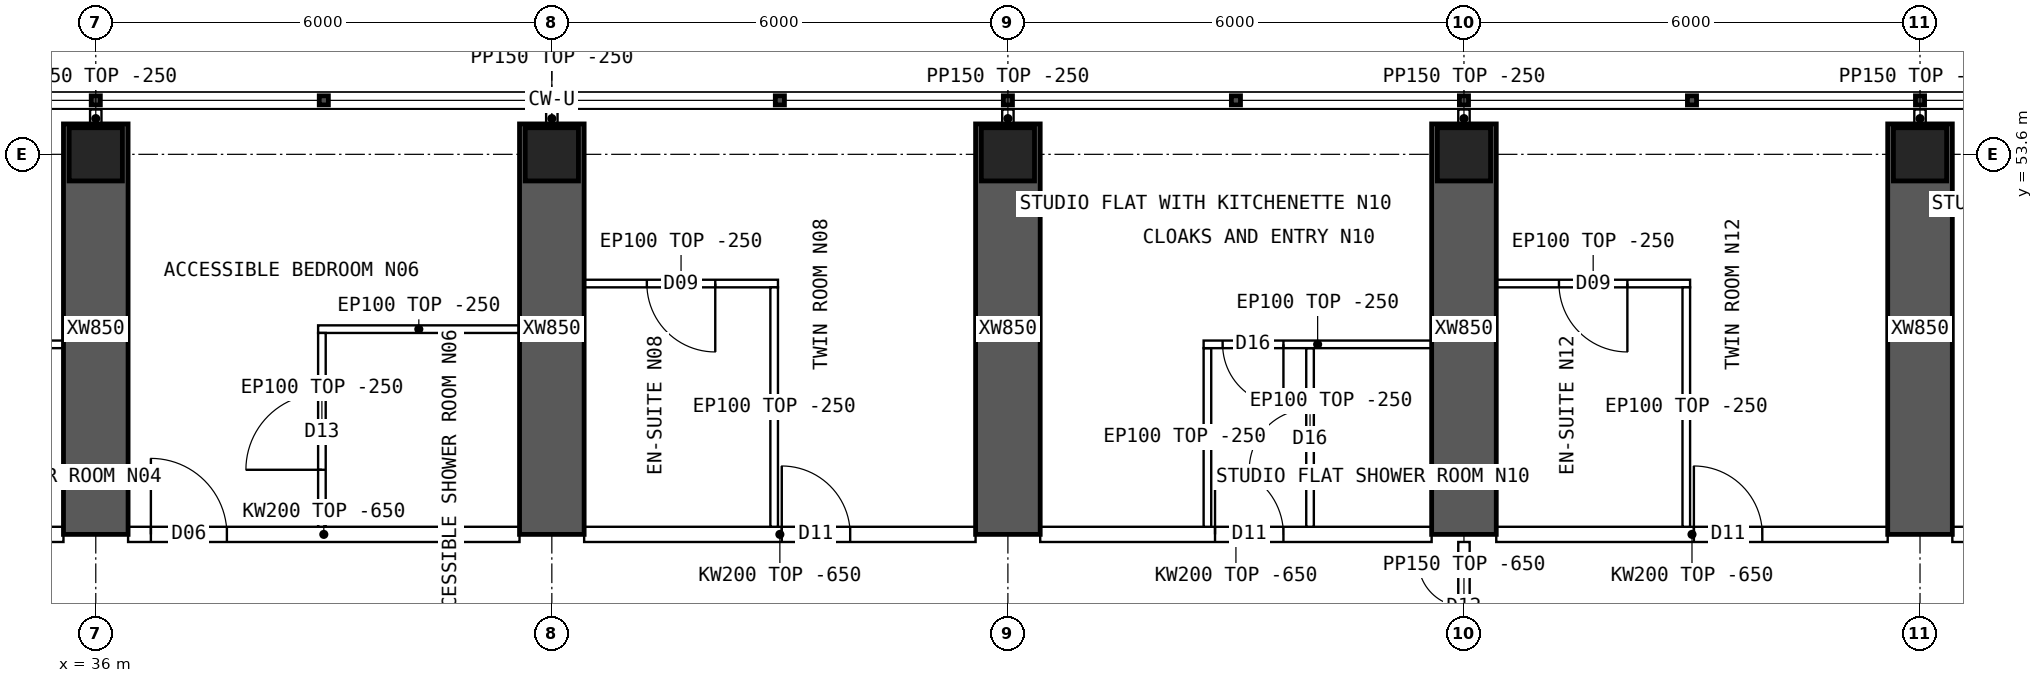
"""IFC4 building model, lengths in metres.
Left out: names, types, materials, properties, quantities, classifications, styles, units other than length and angle.
Written with IfcOpenShell. Run it as: python <this file> out.ifc"""

import sys

from ifc_helpers import new_model, si_unit, direction, frame, frame_2d, origin, origin_2d, place, context, subcontext, project, spatial, polyline, rectangle, hollow_rectangle, outline, extrude, element, fill, save


model = new_model("IFC4")
c1 = context("Model", 3, precision=1e-05, world=origin(), true_north=direction((0.0, 1.0)))
c2 = subcontext(c1, "Body", "Model", "MODEL_VIEW")
j1 = project(units=[si_unit("LENGTHUNIT", "METRE"), si_unit("PLANEANGLEUNIT", "RADIAN")], contexts=[c1])
p1 = place(None, origin())
s1 = spatial("IfcSite", under=j1, at=p1, CompositionType="ELEMENT")
p2 = place(p1, origin())
s2 = spatial("IfcBuilding", under=s1, at=p2, CompositionType="ELEMENT")
p3 = place(p2, frame((0.0, 0.0, 182.35)))
s3 = spatial("IfcBuildingStorey", under=s2, at=p3, CompositionType="ELEMENT", Elevation=182.35)
for number, where, z_axis, x_axis in (
    (1, (36.0, 53.6, 0.0), (0.0, 0.0, 1.0), (1.0, 0.0, 0.0)),
    (2, (42.0, 53.6, 0.0), (0.0, 0.0, 1.0), (1.0, 0.0, 0.0)),
    (3, (48.0, 53.6, 0.0), (0.0, 0.0, 1.0), (1.0, 0.0, 0.0)),
    (4, (54.0, 53.6, 0.0), (0.0, 0.0, 1.0), (1.0, 0.0, 0.0)),
    (5, (60.0, 53.6, 0.0), (0.0, 0.0, 1.0), (1.0, 0.0, 0.0)),
):
    element("IfcColumn", number, at=place(p3, frame(where, z_axis=z_axis, x_axis=x_axis)), inside=s3, PredefinedType="COLUMN", context=c2, shape_type="SweptSolid", body=[
        extrude(hollow_rectangle(XDim=0.7, YDim=0.7, WallThickness=0.07, at=origin_2d()), origin(), (0.0, 0.0, 1.0), 3.75),
    ])
for number, where, z_axis, x_axis in (
    (6, (36.0, 48.6, 0.0), (0.0, 0.0, 1.0), (0.0, 1.0, 0.0)),
    (7, (42.0, 48.6, 0.0), (0.0, 0.0, 1.0), (0.0, 1.0, 0.0)),
    (8, (48.0, 48.6, 0.0), (0.0, 0.0, 1.0), (0.0, 1.0, 0.0)),
    (9, (54.0, 48.6, 0.0), (0.0, 0.0, 1.0), (0.0, 1.0, 0.0)),
    (10, (60.0, 48.6, 0.0), (0.0, 0.0, 1.0), (0.0, 1.0, 0.0)),
):
    element("IfcWall", number, at=place(p3, frame(where, z_axis=z_axis, x_axis=x_axis)), inside=s3, PredefinedType="SHEAR", context=c2, shape_type="SweptSolid", body=[
        extrude(rectangle(XDim=5.4, YDim=0.85, at=frame_2d((2.7, 0.0))), origin(), (0.0, 0.0, 1.0), 3.75),
    ])
p4 = place(p3, frame((30.425, 48.6, 0.0), z_axis=(0.0, 0.0, 1.0), x_axis=(1.0, 0.0, 0.0)))
e11 = element("IfcWall", 11, at=p4, inside=s3, PredefinedType="SOLIDWALL", context=c2, shape_type="SweptSolid", body=[
    extrude(outline(polyline([(0.0, 0.0), (5.15, 0.0), (5.15, 3.1), (0.0, 3.1), (0.0, 0.0)])), frame((0.0, 0.1, 0.0), z_axis=(0.0, -1.0, 0.0), x_axis=(1.0, 0.0, 0.0)), (0.0, 0.0, 1.0), 0.2),
])
p5 = place(p4, frame((2.3, 0.0, 0.0)))
e12 = element("IfcOpeningElement", 12, at=p5, cuts=e11, PredefinedType="OPENING", context=c2, shape_type="SweptSolid", body=[
    extrude(rectangle(XDim=0.9, YDim=2.1, at=frame_2d((0.45, 1.05))), frame((0.0, 0.11, 0.0), z_axis=(0.0, -1.0, 0.0), x_axis=(1.0, 0.0, 0.0)), (0.0, 0.0, 1.0), 0.22),
])
p6 = place(p3, frame((36.425, 48.6, 0.0), z_axis=(0.0, 0.0, 1.0), x_axis=(1.0, 0.0, 0.0)))
e13 = element("IfcWall", 13, at=p6, inside=s3, PredefinedType="SOLIDWALL", context=c2, shape_type="SweptSolid", body=[
    extrude(outline(polyline([(0.0, 0.0), (5.15, 0.0), (5.15, 3.1), (0.0, 3.1), (0.0, 0.0)])), frame((0.0, 0.1, 0.0), z_axis=(0.0, -1.0, 0.0), x_axis=(1.0, 0.0, 0.0)), (0.0, 0.0, 1.0), 0.2),
])
p7 = place(p6, frame((0.3, 0.0, 0.0)))
e14 = element("IfcOpeningElement", 14, at=p7, cuts=e13, PredefinedType="OPENING", context=c2, shape_type="SweptSolid", body=[
    extrude(rectangle(XDim=1.0, YDim=2.1, at=frame_2d((0.5, 1.05))), frame((0.0, 0.11, 0.0), z_axis=(0.0, -1.0, 0.0), x_axis=(1.0, 0.0, 0.0)), (0.0, 0.0, 1.0), 0.22),
])
p8 = place(p3, frame((42.425, 48.6, 0.0), z_axis=(0.0, 0.0, 1.0), x_axis=(1.0, 0.0, 0.0)))
e15 = element("IfcWall", 15, at=p8, inside=s3, PredefinedType="SOLIDWALL", context=c2, shape_type="SweptSolid", body=[
    extrude(outline(polyline([(0.0, 0.0), (5.15, 0.0), (5.15, 3.1), (0.0, 3.1), (0.0, 0.0)])), frame((0.0, 0.1, 0.0), z_axis=(0.0, -1.0, 0.0), x_axis=(1.0, 0.0, 0.0)), (0.0, 0.0, 1.0), 0.2),
])
p9 = place(p8, frame((2.6, 0.0, 0.0)))
e16 = element("IfcOpeningElement", 16, at=p9, cuts=e15, PredefinedType="OPENING", context=c2, shape_type="SweptSolid", body=[
    extrude(rectangle(XDim=0.9, YDim=2.1, at=frame_2d((0.45, 1.05))), frame((0.0, 0.11, 0.0), z_axis=(0.0, -1.0, 0.0), x_axis=(1.0, 0.0, 0.0)), (0.0, 0.0, 1.0), 0.22),
])
p10 = place(p3, frame((48.425, 48.6, 0.0), z_axis=(0.0, 0.0, 1.0), x_axis=(1.0, 0.0, 0.0)))
e17 = element("IfcWall", 17, at=p10, inside=s3, PredefinedType="SOLIDWALL", context=c2, shape_type="SweptSolid", body=[
    extrude(outline(polyline([(0.0, 0.0), (5.15, 0.0), (5.15, 3.1), (0.0, 3.1), (0.0, 0.0)])), frame((0.0, 0.1, 0.0), z_axis=(0.0, -1.0, 0.0), x_axis=(1.0, 0.0, 0.0)), (0.0, 0.0, 1.0), 0.2),
])
p11 = place(p10, frame((2.3, 0.0, 0.0)))
e18 = element("IfcOpeningElement", 18, at=p11, cuts=e17, PredefinedType="OPENING", context=c2, shape_type="SweptSolid", body=[
    extrude(rectangle(XDim=0.9, YDim=2.1, at=frame_2d((0.45, 1.05))), frame((0.0, 0.11, 0.0), z_axis=(0.0, -1.0, 0.0), x_axis=(1.0, 0.0, 0.0)), (0.0, 0.0, 1.0), 0.22),
])
p12 = place(p3, frame((54.425, 48.6, 0.0), z_axis=(0.0, 0.0, 1.0), x_axis=(1.0, 0.0, 0.0)))
e19 = element("IfcWall", 19, at=p12, inside=s3, PredefinedType="SOLIDWALL", context=c2, shape_type="SweptSolid", body=[
    extrude(outline(polyline([(0.0, 0.0), (5.15, 0.0), (5.15, 3.1), (0.0, 3.1), (0.0, 0.0)])), frame((0.0, 0.1, 0.0), z_axis=(0.0, -1.0, 0.0), x_axis=(1.0, 0.0, 0.0)), (0.0, 0.0, 1.0), 0.2),
])
p13 = place(p12, frame((2.6, 0.0, 0.0)))
e20 = element("IfcOpeningElement", 20, at=p13, cuts=e19, PredefinedType="OPENING", context=c2, shape_type="SweptSolid", body=[
    extrude(rectangle(XDim=0.9, YDim=2.1, at=frame_2d((0.45, 1.05))), frame((0.0, 0.11, 0.0), z_axis=(0.0, -1.0, 0.0), x_axis=(1.0, 0.0, 0.0)), (0.0, 0.0, 1.0), 0.22),
])
p14 = place(p3, frame((60.425, 48.6, 0.0), z_axis=(0.0, 0.0, 1.0), x_axis=(1.0, 0.0, 0.0)))
e21 = element("IfcWall", 21, at=p14, inside=s3, PredefinedType="SOLIDWALL", context=c2, shape_type="SweptSolid", body=[
    extrude(outline(polyline([(0.0, 0.0), (5.15, 0.0), (5.15, 3.1), (0.0, 3.1), (0.0, 0.0)])), frame((0.0, 0.1, 0.0), z_axis=(0.0, -1.0, 0.0), x_axis=(1.0, 0.0, 0.0)), (0.0, 0.0, 1.0), 0.2),
])
p15 = place(p14, frame((2.3, 0.0, 0.0)))
e22 = element("IfcOpeningElement", 22, at=p15, cuts=e21, PredefinedType="OPENING", context=c2, shape_type="SweptSolid", body=[
    extrude(rectangle(XDim=0.9, YDim=2.1, at=frame_2d((0.45, 1.05))), frame((0.0, 0.11, 0.0), z_axis=(0.0, -1.0, 0.0), x_axis=(1.0, 0.0, 0.0)), (0.0, 0.0, 1.0), 0.22),
])
p16 = place(p3, frame((32.575, 51.1, 0.0), z_axis=(0.0, 0.0, 1.0), x_axis=(1.0, 0.0, 0.0)))
e23 = element("IfcWall", 23, at=p16, inside=s3, PredefinedType="PARTITIONING", context=c2, shape_type="SweptSolid", body=[
    extrude(rectangle(XDim=3.0, YDim=0.1, at=frame_2d((1.5, 0.0))), origin(), (0.0, 0.0, 1.0), 3.5),
])
p17 = place(p16, frame((0.25, 0.0, 0.0)))
e24 = element("IfcOpeningElement", 24, at=p17, cuts=e23, PredefinedType="OPENING", context=c2, shape_type="SweptSolid", body=[
    extrude(rectangle(XDim=0.8, YDim=2.1, at=frame_2d((0.4, 1.05))), frame((0.0, 0.06, 0.0), z_axis=(0.0, -1.0, 0.0), x_axis=(1.0, 0.0, 0.0)), (0.0, 0.0, 1.0), 0.12),
])
p18 = place(p3, frame((38.925, 51.3, 0.0), z_axis=(0.0, 0.0, 1.0), x_axis=(1.0, 0.0, 0.0)))
e25 = element("IfcWall", 25, at=p18, inside=s3, PredefinedType="PARTITIONING", context=c2, shape_type="SweptSolid", body=[
    extrude(rectangle(XDim=2.65, YDim=0.1, at=frame_2d((1.325, 0.0))), origin(), (0.0, 0.0, 1.0), 3.5),
])
p19 = place(p3, frame((38.975, 51.25, 0.0), z_axis=(0.0, 0.0, 1.0), x_axis=(0.0, -1.0, 0.0)))
e26 = element("IfcWall", 26, at=p19, inside=s3, PredefinedType="PARTITIONING", context=c2, shape_type="SweptSolid", body=[
    extrude(outline(polyline([(0.0, 0.0), (2.55, 0.0), (2.55, 3.1), (2.502, 3.1), (2.5, 3.5), (0.0, 3.5), (0.0, 0.0)])), frame((0.0, 0.05, 0.0), z_axis=(0.0, -1.0, 0.0), x_axis=(1.0, 0.0, 0.0)), (0.0, 0.0, 1.0), 0.1),
])
p20 = place(p19, frame((0.8, 0.0, 0.0)))
e27 = element("IfcOpeningElement", 27, at=p20, cuts=e26, PredefinedType="OPENING", context=c2, shape_type="SweptSolid", body=[
    extrude(rectangle(XDim=1.0, YDim=2.1, at=frame_2d((0.5, 1.05))), frame((0.0, 0.06, 0.0), z_axis=(0.0, -1.0, 0.0), x_axis=(1.0, 0.0, 0.0)), (0.0, 0.0, 1.0), 0.12),
])
p21 = place(p3, frame((42.425, 51.9, 0.0), z_axis=(0.0, 0.0, 1.0), x_axis=(1.0, 0.0, 0.0)))
e28 = element("IfcWall", 28, at=p21, inside=s3, PredefinedType="PARTITIONING", context=c2, shape_type="SweptSolid", body=[
    extrude(rectangle(XDim=2.55, YDim=0.1, at=frame_2d((1.275, 0.0))), origin(), (0.0, 0.0, 1.0), 3.5),
])
p22 = place(p21, frame((0.825, 0.0, 0.0)))
e29 = element("IfcOpeningElement", 29, at=p22, cuts=e28, PredefinedType="OPENING", context=c2, shape_type="SweptSolid", body=[
    extrude(rectangle(XDim=0.9, YDim=2.1, at=frame_2d((0.45, 1.05))), frame((0.0, 0.06, 0.0), z_axis=(0.0, -1.0, 0.0), x_axis=(1.0, 0.0, 0.0)), (0.0, 0.0, 1.0), 0.12),
])
p23 = place(p3, frame((44.925, 51.85, 0.0), z_axis=(0.0, 0.0, 1.0), x_axis=(0.0, -1.0, 0.0)))
e30 = element("IfcWall", 30, at=p23, inside=s3, PredefinedType="PARTITIONING", context=c2, shape_type="SweptSolid", body=[
    extrude(outline(polyline([(0.0, 0.0), (3.15, 0.0), (3.15, 3.1), (3.102, 3.1), (3.1, 3.5), (0.0, 3.5), (0.0, 0.0)])), frame((0.0, 0.05, 0.0), z_axis=(0.0, -1.0, 0.0), x_axis=(1.0, 0.0, 0.0)), (0.0, 0.0, 1.0), 0.1),
])
p24 = place(p3, frame((50.575, 51.1, 0.0), z_axis=(0.0, 0.0, 1.0), x_axis=(1.0, 0.0, 0.0)))
e31 = element("IfcWall", 31, at=p24, inside=s3, PredefinedType="PARTITIONING", context=c2, shape_type="SweptSolid", body=[
    extrude(rectangle(XDim=3.0, YDim=0.1, at=frame_2d((1.5, 0.0))), origin(), (0.0, 0.0, 1.0), 3.5),
])
p25 = place(p24, frame((0.25, 0.0, 0.0)))
e32 = element("IfcOpeningElement", 32, at=p25, cuts=e31, PredefinedType="OPENING", context=c2, shape_type="SweptSolid", body=[
    extrude(rectangle(XDim=0.8, YDim=2.1, at=frame_2d((0.4, 1.05))), frame((0.0, 0.06, 0.0), z_axis=(0.0, -1.0, 0.0), x_axis=(1.0, 0.0, 0.0)), (0.0, 0.0, 1.0), 0.12),
])
p26 = place(p3, frame((50.625, 51.05, 0.0), z_axis=(0.0, 0.0, 1.0), x_axis=(0.0, -1.0, 0.0)))
e33 = element("IfcWall", 33, at=p26, inside=s3, PredefinedType="PARTITIONING", context=c2, shape_type="SweptSolid", body=[
    extrude(outline(polyline([(0.0, 0.0), (2.35, 0.0), (2.35, 3.1), (2.302, 3.1), (2.3, 3.5), (0.0, 3.5), (0.0, 0.0)])), frame((0.0, 0.05, 0.0), z_axis=(0.0, -1.0, 0.0), x_axis=(1.0, 0.0, 0.0)), (0.0, 0.0, 1.0), 0.1),
])
p27 = place(p3, frame((51.975, 51.05, 0.0), z_axis=(0.0, 0.0, 1.0), x_axis=(0.0, -1.0, 0.0)))
e34 = element("IfcWall", 34, at=p27, inside=s3, PredefinedType="PARTITIONING", context=c2, shape_type="SweptSolid", body=[
    extrude(outline(polyline([(0.0, 0.0), (2.35, 0.0), (2.35, 3.1), (2.302, 3.1), (2.3, 3.5), (0.0, 3.5), (0.0, 0.0)])), frame((0.0, 0.05, 0.0), z_axis=(0.0, -1.0, 0.0), x_axis=(1.0, 0.0, 0.0)), (0.0, 0.0, 1.0), 0.1),
])
p28 = place(p27, frame((0.8, 0.0, 0.0)))
e35 = element("IfcOpeningElement", 35, at=p28, cuts=e34, PredefinedType="OPENING", context=c2, shape_type="SweptSolid", body=[
    extrude(rectangle(XDim=0.8, YDim=2.1, at=frame_2d((0.4, 1.05))), frame((0.0, 0.06, 0.0), z_axis=(0.0, -1.0, 0.0), x_axis=(1.0, 0.0, 0.0)), (0.0, 0.0, 1.0), 0.12),
])
p29 = place(p3, frame((54.425, 51.9, 0.0), z_axis=(0.0, 0.0, 1.0), x_axis=(1.0, 0.0, 0.0)))
e36 = element("IfcWall", 36, at=p29, inside=s3, PredefinedType="PARTITIONING", context=c2, shape_type="SweptSolid", body=[
    extrude(rectangle(XDim=2.55, YDim=0.1, at=frame_2d((1.275, 0.0))), origin(), (0.0, 0.0, 1.0), 3.5),
])
p30 = place(p29, frame((0.825, 0.0, 0.0)))
e37 = element("IfcOpeningElement", 37, at=p30, cuts=e36, PredefinedType="OPENING", context=c2, shape_type="SweptSolid", body=[
    extrude(rectangle(XDim=0.9, YDim=2.1, at=frame_2d((0.45, 1.05))), frame((0.0, 0.06, 0.0), z_axis=(0.0, -1.0, 0.0), x_axis=(1.0, 0.0, 0.0)), (0.0, 0.0, 1.0), 0.12),
])
p31 = place(p3, frame((56.925, 51.85, 0.0), z_axis=(0.0, 0.0, 1.0), x_axis=(0.0, -1.0, 0.0)))
e38 = element("IfcWall", 38, at=p31, inside=s3, PredefinedType="PARTITIONING", context=c2, shape_type="SweptSolid", body=[
    extrude(outline(polyline([(0.0, 0.0), (3.15, 0.0), (3.15, 3.1), (3.102, 3.1), (3.1, 3.5), (0.0, 3.5), (0.0, 0.0)])), frame((0.0, 0.05, 0.0), z_axis=(0.0, -1.0, 0.0), x_axis=(1.0, 0.0, 0.0)), (0.0, 0.0, 1.0), 0.1),
])
p32 = place(p3, frame((54.0, 46.8, 0.0), z_axis=(0.0, 0.0, 1.0), x_axis=(0.0, 1.0, 0.0)))
e39 = element("IfcWall", 39, at=p32, inside=s3, PredefinedType="PARTITIONING", context=c2, shape_type="SweptSolid", body=[
    extrude(outline(polyline([(0.0, 0.0), (1.7, 0.0), (1.7, 3.1), (0.0, 3.1), (0.0, 0.0)])), frame((0.0, 0.075, 0.0), z_axis=(0.0, -1.0, 0.0), x_axis=(1.0, 0.0, 0.0)), (0.0, 0.0, 1.0), 0.15),
])
p33 = place(p32, frame((0.25, 0.0, 0.0)))
e40 = element("IfcOpeningElement", 40, at=p33, cuts=e39, PredefinedType="OPENING", context=c2, shape_type="SweptSolid", body=[
    extrude(rectangle(XDim=1.2, YDim=2.1, at=frame_2d((0.6, 1.05))), frame((0.0, 0.085, 0.0), z_axis=(0.0, -1.0, 0.0), x_axis=(1.0, 0.0, 0.0)), (0.0, 0.0, 1.0), 0.17),
])
for number, where, z_axis, x_axis in (
    (41, (36.0, 53.95, 0.0), (0.0, 0.0, 1.0), (0.0, 1.0, 0.0)),
    (42, (42.0, 53.95, 0.0), (0.0, 0.0, 1.0), (0.0, 1.0, 0.0)),
    (43, (48.0, 53.95, 0.0), (0.0, 0.0, 1.0), (0.0, 1.0, 0.0)),
    (44, (54.0, 53.95, 0.0), (0.0, 0.0, 1.0), (0.0, 1.0, 0.0)),
    (45, (60.0, 53.95, 0.0), (0.0, 0.0, 1.0), (0.0, 1.0, 0.0)),
):
    element("IfcWall", number, at=place(p3, frame(where, z_axis=z_axis, x_axis=x_axis)), inside=s3, PredefinedType="PARTITIONING", context=c2, shape_type="SweptSolid", body=[
        extrude(rectangle(XDim=0.24, YDim=0.15, at=frame_2d((0.12, 0.0))), origin(), (0.0, 0.0, 1.0), 3.5),
    ])
p34 = place(p20, origin())
e46 = element("IfcDoor", 46, at=p34, inside=s3, OperationType="SINGLE_SWING_RIGHT", PredefinedType="DOOR", context=c2, shape_type="SweptSolid", body=[
    extrude(rectangle(XDim=1.0, YDim=2.1, at=frame_2d((0.5, 1.05))), frame((0.0, 0.025, 0.0), z_axis=(0.0, -1.0, 0.0), x_axis=(1.0, 0.0, 0.0)), (0.0, 0.0, 1.0), 0.05),
])
fill(e27, e46)
p35 = place(p7, origin())
e47 = element("IfcDoor", 47, at=p35, inside=s3, OperationType="SINGLE_SWING_LEFT", PredefinedType="DOOR", context=c2, shape_type="SweptSolid", body=[
    extrude(rectangle(XDim=1.0, YDim=2.1, at=frame_2d((0.5, 1.05))), frame((0.0, 0.025, 0.0), z_axis=(0.0, -1.0, 0.0), x_axis=(1.0, 0.0, 0.0)), (0.0, 0.0, 1.0), 0.05),
])
fill(e14, e47)
p36 = place(p22, origin())
e48 = element("IfcDoor", 48, at=p36, inside=s3, OperationType="SINGLE_SWING_RIGHT", PredefinedType="DOOR", context=c2, shape_type="SweptSolid", body=[
    extrude(rectangle(XDim=0.9, YDim=2.1, at=frame_2d((0.45, 1.05))), frame((0.0, 0.025, 0.0), z_axis=(0.0, -1.0, 0.0), x_axis=(1.0, 0.0, 0.0)), (0.0, 0.0, 1.0), 0.05),
])
fill(e29, e48)
p37 = place(p9, origin())
e49 = element("IfcDoor", 49, at=p37, inside=s3, OperationType="SINGLE_SWING_LEFT", PredefinedType="DOOR", context=c2, shape_type="SweptSolid", body=[
    extrude(rectangle(XDim=0.9, YDim=2.1, at=frame_2d((0.45, 1.05))), frame((0.0, 0.025, 0.0), z_axis=(0.0, -1.0, 0.0), x_axis=(1.0, 0.0, 0.0)), (0.0, 0.0, 1.0), 0.05),
])
fill(e16, e49)
p38 = place(p25, origin())
e50 = element("IfcDoor", 50, at=p38, inside=s3, OperationType="SINGLE_SWING_RIGHT", PredefinedType="DOOR", context=c2, shape_type="SweptSolid", body=[
    extrude(rectangle(XDim=0.8, YDim=2.1, at=frame_2d((0.4, 1.05))), frame((0.0, 0.025, 0.0), z_axis=(0.0, -1.0, 0.0), x_axis=(1.0, 0.0, 0.0)), (0.0, 0.0, 1.0), 0.05),
])
fill(e32, e50)
p39 = place(p28, origin())
e51 = element("IfcDoor", 51, at=p39, inside=s3, OperationType="SINGLE_SWING_RIGHT", PredefinedType="DOOR", context=c2, shape_type="SweptSolid", body=[
    extrude(rectangle(XDim=0.8, YDim=2.1, at=frame_2d((0.4, 1.05))), frame((0.0, 0.025, 0.0), z_axis=(0.0, -1.0, 0.0), x_axis=(1.0, 0.0, 0.0)), (0.0, 0.0, 1.0), 0.05),
])
fill(e35, e51)
p40 = place(p11, origin())
e52 = element("IfcDoor", 52, at=p40, inside=s3, OperationType="SINGLE_SWING_LEFT", PredefinedType="DOOR", context=c2, shape_type="SweptSolid", body=[
    extrude(rectangle(XDim=0.9, YDim=2.1, at=frame_2d((0.45, 1.05))), frame((0.0, 0.025, 0.0), z_axis=(0.0, -1.0, 0.0), x_axis=(1.0, 0.0, 0.0)), (0.0, 0.0, 1.0), 0.05),
])
fill(e18, e52)
p41 = place(p30, origin())
e53 = element("IfcDoor", 53, at=p41, inside=s3, OperationType="SINGLE_SWING_RIGHT", PredefinedType="DOOR", context=c2, shape_type="SweptSolid", body=[
    extrude(rectangle(XDim=0.9, YDim=2.1, at=frame_2d((0.45, 1.05))), frame((0.0, 0.025, 0.0), z_axis=(0.0, -1.0, 0.0), x_axis=(1.0, 0.0, 0.0)), (0.0, 0.0, 1.0), 0.05),
])
fill(e37, e53)
p42 = place(p13, origin())
e54 = element("IfcDoor", 54, at=p42, inside=s3, OperationType="SINGLE_SWING_LEFT", PredefinedType="DOOR", context=c2, shape_type="SweptSolid", body=[
    extrude(rectangle(XDim=0.9, YDim=2.1, at=frame_2d((0.45, 1.05))), frame((0.0, 0.025, 0.0), z_axis=(0.0, -1.0, 0.0), x_axis=(1.0, 0.0, 0.0)), (0.0, 0.0, 1.0), 0.05),
])
fill(e20, e54)
p43 = place(p33, origin())
e55 = element("IfcDoor", 55, at=p43, inside=s3, OperationType="DOUBLE_DOOR_SINGLE_SWING", PredefinedType="DOOR", context=c2, shape_type="SweptSolid", body=[
    extrude(rectangle(XDim=1.2, YDim=2.1, at=frame_2d((0.6, 1.05))), frame((0.0, 0.025, 0.0), z_axis=(0.0, -1.0, 0.0), x_axis=(1.0, 0.0, 0.0)), (0.0, 0.0, 1.0), 0.05),
])
fill(e40, e55)
save(model, sys.argv[1])
